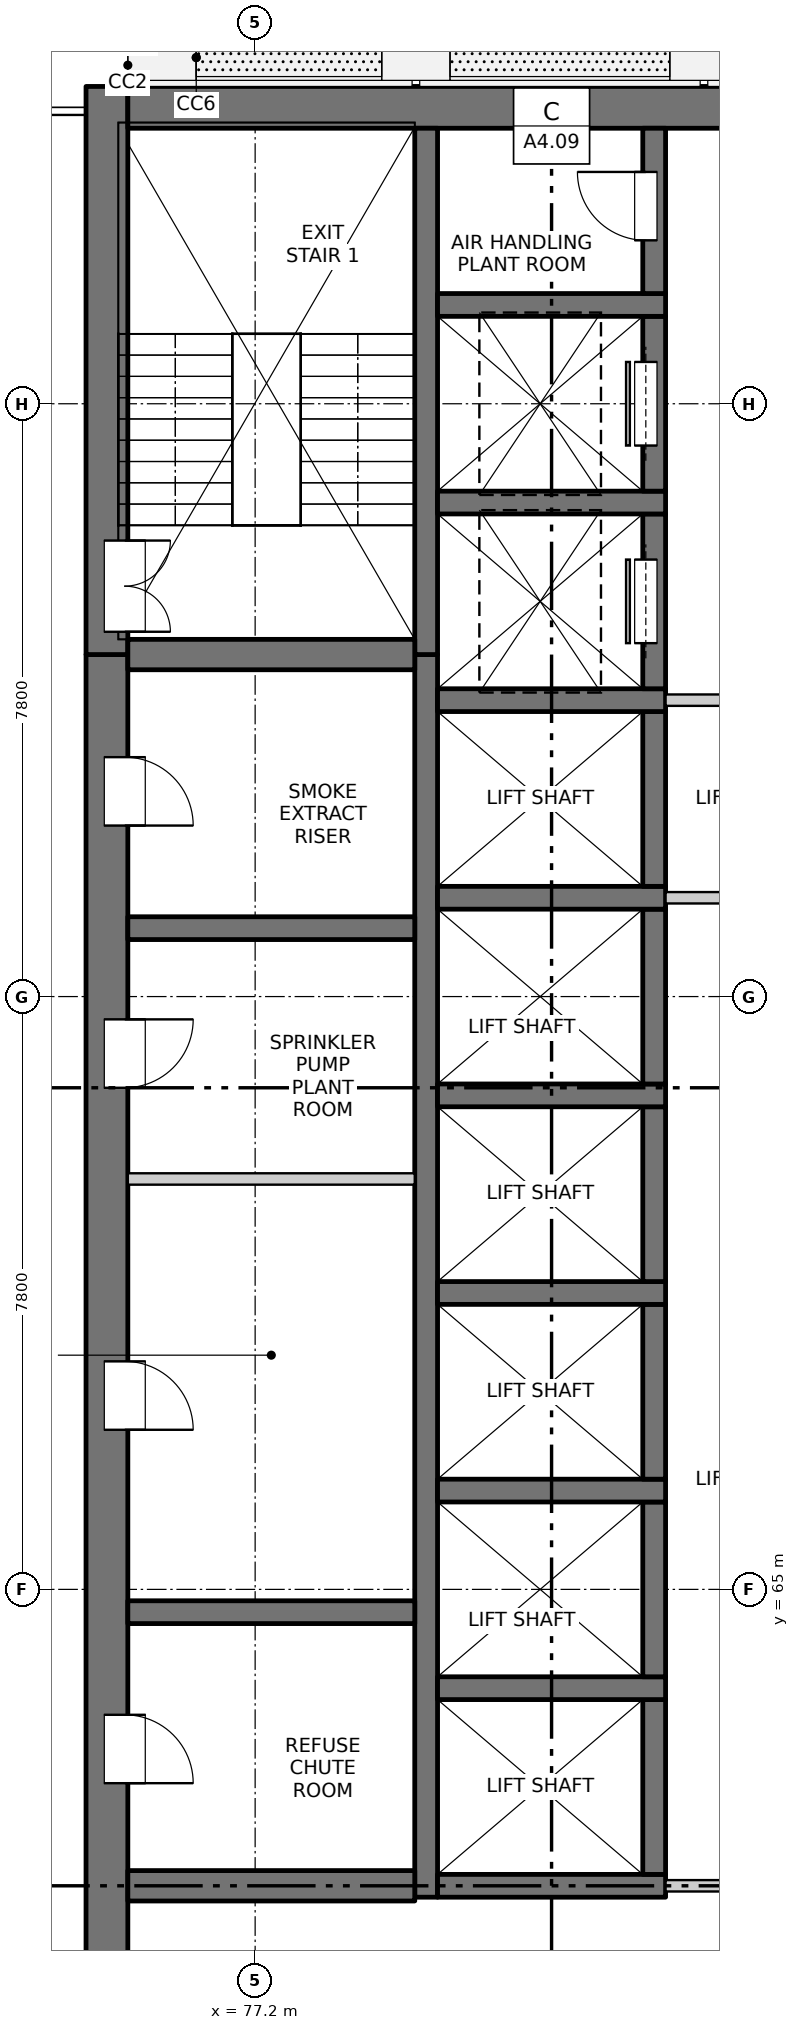
"""IFC4 building model, lengths in metres.
Left out: names, types, materials, properties, quantities, classifications, styles, units other than length and angle.
Written with IfcOpenShell. Run it as: python <this file> out.ifc"""

import sys

from ifc_helpers import new_model, si_unit, direction, frame, frame_2d, origin, place, context, subcontext, project, spatial, rectangle, extrude, element, fill, save


model = new_model("IFC4")
c1 = context("Model", 3, precision=1e-05, world=origin(), true_north=direction((0.0, 1.0)))
c2 = subcontext(c1, "Body", "Model", "MODEL_VIEW")
j1 = project(units=[si_unit("LENGTHUNIT", "METRE"), si_unit("PLANEANGLEUNIT", "RADIAN")], contexts=[c1])
p1 = place(None, origin())
s1 = spatial("IfcSite", under=j1, at=p1, CompositionType="ELEMENT")
p2 = place(p1, origin())
s2 = spatial("IfcBuilding", under=s1, at=p2, CompositionType="ELEMENT")
p3 = place(p2, frame((0.0, 0.0, 116.9)))
s3 = spatial("IfcBuildingStorey", under=s2, at=p3, CompositionType="ELEMENT", Elevation=116.9)
p4 = place(p3, frame((75.25, 54.975, -0.3), z_axis=(0.0, 0.0, 1.0), x_axis=(0.0, 1.0, 0.0)))
e1 = element("IfcWall", 1, at=p4, inside=s3, PredefinedType="SOLIDWALL", context=c2, shape_type="SweptSolid", body=[
    extrude(rectangle(XDim=22.325, YDim=0.55, at=frame_2d((11.163, 0.0))), origin(), (0.0, 0.0, 1.0), 6.8),
])
p5 = place(p4, frame((7.475, 0.0, 0.3)))
e2 = element("IfcOpeningElement", 2, at=p5, cuts=e1, PredefinedType="OPENING", context=c2, shape_type="SweptSolid", body=[
    extrude(rectangle(XDim=0.9, YDim=2.1, at=frame_2d((0.45, 1.05))), frame((0.0, 0.285, 0.0), z_axis=(0.0, -1.0, 0.0), x_axis=(1.0, 0.0, 0.0)), (0.0, 0.0, 1.0), 0.57),
])
p6 = place(p4, frame((12.125, 0.0, 0.3)))
e3 = element("IfcOpeningElement", 3, at=p6, cuts=e1, PredefinedType="OPENING", context=c2, shape_type="SweptSolid", body=[
    extrude(rectangle(XDim=0.9, YDim=2.1, at=frame_2d((0.45, 1.05))), frame((0.0, 0.285, 0.0), z_axis=(0.0, -1.0, 0.0), x_axis=(1.0, 0.0, 0.0)), (0.0, 0.0, 1.0), 0.57),
])
p7 = place(p4, frame((16.625, 0.0, 0.3)))
e4 = element("IfcOpeningElement", 4, at=p7, cuts=e1, PredefinedType="OPENING", context=c2, shape_type="SweptSolid", body=[
    extrude(rectangle(XDim=0.9, YDim=2.1, at=frame_2d((0.45, 1.05))), frame((0.0, 0.285, 0.0), z_axis=(0.0, -1.0, 0.0), x_axis=(1.0, 0.0, 0.0)), (0.0, 0.0, 1.0), 0.57),
])
p8 = place(p4, frame((20.075, 0.0, 0.3)))
e5 = element("IfcOpeningElement", 5, at=p8, cuts=e1, PredefinedType="OPENING", context=c2, shape_type="SweptSolid", body=[
    extrude(rectangle(XDim=0.9, YDim=2.1, at=frame_2d((0.45, 1.05))), frame((0.0, 0.285, 0.0), z_axis=(0.0, -1.0, 0.0), x_axis=(1.0, 0.0, 0.0)), (0.0, 0.0, 1.0), 0.57),
])
p9 = place(p3, frame((75.25, 77.3, -0.3), z_axis=(0.0, 0.0, 1.0), x_axis=(0.0, 1.0, 0.0)))
e6 = element("IfcWall", 6, at=p9, inside=s3, PredefinedType="SOLIDWALL", context=c2, shape_type="SweptSolid", body=[
    extrude(rectangle(XDim=7.475, YDim=0.55, at=frame_2d((3.737, 0.0))), origin(), (0.0, 0.0, 1.0), 6.8),
])
p10 = place(p9, frame((0.3, 0.0, 0.3)))
e7 = element("IfcOpeningElement", 7, at=p10, cuts=e6, PredefinedType="OPENING", context=c2, shape_type="SweptSolid", body=[
    extrude(rectangle(XDim=1.2, YDim=2.1, at=frame_2d((0.6, 1.05))), frame((0.0, 0.285, 0.0), z_axis=(0.0, -1.0, 0.0), x_axis=(1.0, 0.0, 0.0)), (0.0, 0.0, 1.0), 0.57),
])
p11 = place(p3, frame((75.525, 84.5, -0.3), z_axis=(0.0, 0.0, 1.0), x_axis=(1.0, 0.0, 0.0)))
e8 = element("IfcWall", 8, at=p11, inside=s3, PredefinedType="SOLIDWALL", context=c2, shape_type="SweptSolid", body=[
    extrude(rectangle(XDim=18.95, YDim=0.55, at=frame_2d((9.475, 0.0))), origin(), (0.0, 0.0, 1.0), 6.8),
])
p12 = place(p3, frame((79.45, 60.95, -0.3), z_axis=(0.0, 0.0, 1.0), x_axis=(0.0, 1.0, 0.0)))
e9 = element("IfcWall", 9, at=p12, inside=s3, PredefinedType="SOLIDWALL", context=c2, shape_type="SweptSolid", body=[
    extrude(rectangle(XDim=16.35, YDim=0.3, at=frame_2d((8.175, 0.0))), origin(), (0.0, 0.0, 1.0), 6.8),
])
p13 = place(p3, frame((79.45, 77.3, -0.3), z_axis=(0.0, 0.0, 1.0), x_axis=(0.0, 1.0, 0.0)))
e10 = element("IfcWall", 10, at=p13, inside=s3, PredefinedType="SOLIDWALL", context=c2, shape_type="SweptSolid", body=[
    extrude(rectangle(XDim=6.925, YDim=0.3, at=frame_2d((3.462, 0.0))), origin(), (0.0, 0.0, 1.0), 6.8),
])
p14 = place(p3, frame((79.6, 61.1, -0.3), z_axis=(0.0, 0.0, 1.0), x_axis=(1.0, 0.0, 0.0)))
e11 = element("IfcWall", 11, at=p14, inside=s3, PredefinedType="SOLIDWALL", context=c2, shape_type="SweptSolid", body=[
    extrude(rectangle(XDim=3.0, YDim=0.3, at=frame_2d((1.5, 0.0))), origin(), (0.0, 0.0, 1.0), 6.8),
])
p15 = place(p3, frame((82.45, 61.25, -0.3), z_axis=(0.0, 0.0, 1.0), x_axis=(0.0, 1.0, 0.0)))
e12 = element("IfcWall", 12, at=p15, inside=s3, PredefinedType="SOLIDWALL", context=c2, shape_type="SweptSolid", body=[
    extrude(rectangle(XDim=2.3, YDim=0.3, at=frame_2d((1.15, 0.0))), origin(), (0.0, 0.0, 1.0), 6.8),
])
p16 = place(p3, frame((79.6, 63.7, -0.3), z_axis=(0.0, 0.0, 1.0), x_axis=(1.0, 0.0, 0.0)))
e13 = element("IfcWall", 13, at=p16, inside=s3, PredefinedType="SOLIDWALL", context=c2, shape_type="SweptSolid", body=[
    extrude(rectangle(XDim=3.0, YDim=0.3, at=frame_2d((1.5, 0.0))), origin(), (0.0, 0.0, 1.0), 6.8),
])
p17 = place(p3, frame((82.45, 63.85, -0.3), z_axis=(0.0, 0.0, 1.0), x_axis=(0.0, 1.0, 0.0)))
e14 = element("IfcWall", 14, at=p17, inside=s3, PredefinedType="SOLIDWALL", context=c2, shape_type="SweptSolid", body=[
    extrude(rectangle(XDim=2.3, YDim=0.3, at=frame_2d((1.15, 0.0))), origin(), (0.0, 0.0, 1.0), 6.8),
])
p18 = place(p3, frame((79.6, 66.3, -0.3), z_axis=(0.0, 0.0, 1.0), x_axis=(1.0, 0.0, 0.0)))
e15 = element("IfcWall", 15, at=p18, inside=s3, PredefinedType="SOLIDWALL", context=c2, shape_type="SweptSolid", body=[
    extrude(rectangle(XDim=3.0, YDim=0.3, at=frame_2d((1.5, 0.0))), origin(), (0.0, 0.0, 1.0), 6.8),
])
p19 = place(p3, frame((82.45, 66.45, -0.3), z_axis=(0.0, 0.0, 1.0), x_axis=(0.0, 1.0, 0.0)))
e16 = element("IfcWall", 16, at=p19, inside=s3, PredefinedType="SOLIDWALL", context=c2, shape_type="SweptSolid", body=[
    extrude(rectangle(XDim=2.3, YDim=0.3, at=frame_2d((1.15, 0.0))), origin(), (0.0, 0.0, 1.0), 6.8),
])
p20 = place(p3, frame((79.6, 68.9, -0.3), z_axis=(0.0, 0.0, 1.0), x_axis=(1.0, 0.0, 0.0)))
e17 = element("IfcWall", 17, at=p20, inside=s3, PredefinedType="SOLIDWALL", context=c2, shape_type="SweptSolid", body=[
    extrude(rectangle(XDim=3.0, YDim=0.3, at=frame_2d((1.5, 0.0))), origin(), (0.0, 0.0, 1.0), 6.8),
])
p21 = place(p3, frame((82.45, 69.05, -0.3), z_axis=(0.0, 0.0, 1.0), x_axis=(0.0, 1.0, 0.0)))
e18 = element("IfcWall", 18, at=p21, inside=s3, PredefinedType="SOLIDWALL", context=c2, shape_type="SweptSolid", body=[
    extrude(rectangle(XDim=2.3, YDim=0.3, at=frame_2d((1.15, 0.0))), origin(), (0.0, 0.0, 1.0), 6.8),
])
p22 = place(p3, frame((79.6, 71.5, -0.3), z_axis=(0.0, 0.0, 1.0), x_axis=(1.0, 0.0, 0.0)))
e19 = element("IfcWall", 19, at=p22, inside=s3, PredefinedType="SOLIDWALL", context=c2, shape_type="SweptSolid", body=[
    extrude(rectangle(XDim=3.0, YDim=0.3, at=frame_2d((1.5, 0.0))), origin(), (0.0, 0.0, 1.0), 6.8),
])
p23 = place(p3, frame((82.45, 71.65, -0.3), z_axis=(0.0, 0.0, 1.0), x_axis=(0.0, 1.0, 0.0)))
e20 = element("IfcWall", 20, at=p23, inside=s3, PredefinedType="SOLIDWALL", context=c2, shape_type="SweptSolid", body=[
    extrude(rectangle(XDim=2.3, YDim=0.3, at=frame_2d((1.15, 0.0))), origin(), (0.0, 0.0, 1.0), 6.8),
])
p24 = place(p3, frame((79.6, 74.1, -0.3), z_axis=(0.0, 0.0, 1.0), x_axis=(1.0, 0.0, 0.0)))
e21 = element("IfcWall", 21, at=p24, inside=s3, PredefinedType="SOLIDWALL", context=c2, shape_type="SweptSolid", body=[
    extrude(rectangle(XDim=3.0, YDim=0.3, at=frame_2d((1.5, 0.0))), origin(), (0.0, 0.0, 1.0), 6.8),
])
p25 = place(p3, frame((82.45, 74.25, -0.3), z_axis=(0.0, 0.0, 1.0), x_axis=(0.0, 1.0, 0.0)))
e22 = element("IfcWall", 22, at=p25, inside=s3, PredefinedType="SOLIDWALL", context=c2, shape_type="SweptSolid", body=[
    extrude(rectangle(XDim=2.3, YDim=0.3, at=frame_2d((1.15, 0.0))), origin(), (0.0, 0.0, 1.0), 6.8),
])
p26 = place(p3, frame((79.6, 76.7, -0.3), z_axis=(0.0, 0.0, 1.0), x_axis=(1.0, 0.0, 0.0)))
e23 = element("IfcWall", 23, at=p26, inside=s3, PredefinedType="SOLIDWALL", context=c2, shape_type="SweptSolid", body=[
    extrude(rectangle(XDim=3.0, YDim=0.3, at=frame_2d((1.5, 0.0))), origin(), (0.0, 0.0, 1.0), 6.8),
])
p27 = place(p3, frame((82.45, 76.85, -0.3), z_axis=(0.0, 0.0, 1.0), x_axis=(0.0, 1.0, 0.0)))
e24 = element("IfcWall", 24, at=p27, inside=s3, PredefinedType="SOLIDWALL", context=c2, shape_type="SweptSolid", body=[
    extrude(rectangle(XDim=2.3, YDim=0.3, at=frame_2d((1.15, 0.0))), origin(), (0.0, 0.0, 1.0), 6.8),
])
p28 = place(p27, frame((0.6, 0.0, 0.3)))
e25 = element("IfcOpeningElement", 25, at=p28, cuts=e24, PredefinedType="OPENING", context=c2, shape_type="SweptSolid", body=[
    extrude(rectangle(XDim=1.1, YDim=2.1, at=frame_2d((0.55, 1.05))), frame((0.0, 0.16, 0.0), z_axis=(0.0, -1.0, 0.0), x_axis=(1.0, 0.0, 0.0)), (0.0, 0.0, 1.0), 0.32),
])
p29 = place(p3, frame((79.6, 79.3, -0.3), z_axis=(0.0, 0.0, 1.0), x_axis=(1.0, 0.0, 0.0)))
e26 = element("IfcWall", 26, at=p29, inside=s3, PredefinedType="SOLIDWALL", context=c2, shape_type="SweptSolid", body=[
    extrude(rectangle(XDim=3.0, YDim=0.3, at=frame_2d((1.5, 0.0))), origin(), (0.0, 0.0, 1.0), 6.8),
])
p30 = place(p3, frame((82.45, 79.45, -0.3), z_axis=(0.0, 0.0, 1.0), x_axis=(0.0, 1.0, 0.0)))
e27 = element("IfcWall", 27, at=p30, inside=s3, PredefinedType="SOLIDWALL", context=c2, shape_type="SweptSolid", body=[
    extrude(rectangle(XDim=2.3, YDim=0.3, at=frame_2d((1.15, 0.0))), origin(), (0.0, 0.0, 1.0), 6.8),
])
p31 = place(p30, frame((0.6, 0.0, 0.3)))
e28 = element("IfcOpeningElement", 28, at=p31, cuts=e27, PredefinedType="OPENING", context=c2, shape_type="SweptSolid", body=[
    extrude(rectangle(XDim=1.1, YDim=2.1, at=frame_2d((0.55, 1.05))), frame((0.0, 0.16, 0.0), z_axis=(0.0, -1.0, 0.0), x_axis=(1.0, 0.0, 0.0)), (0.0, 0.0, 1.0), 0.32),
])
p32 = place(p3, frame((79.6, 81.9, -0.3), z_axis=(0.0, 0.0, 1.0), x_axis=(1.0, 0.0, 0.0)))
e29 = element("IfcWall", 29, at=p32, inside=s3, PredefinedType="SOLIDWALL", context=c2, shape_type="SweptSolid", body=[
    extrude(rectangle(XDim=3.0, YDim=0.3, at=frame_2d((1.5, 0.0))), origin(), (0.0, 0.0, 1.0), 6.8),
])
p33 = place(p3, frame((82.45, 82.05, -0.3), z_axis=(0.0, 0.0, 1.0), x_axis=(0.0, 1.0, 0.0)))
e30 = element("IfcWall", 30, at=p33, inside=s3, PredefinedType="SOLIDWALL", context=c2, shape_type="SweptSolid", body=[
    extrude(rectangle(XDim=2.175, YDim=0.3, at=frame_2d((1.087, 0.0))), origin(), (0.0, 0.0, 1.0), 6.8),
])
p34 = place(p33, frame((0.7, 0.0, 0.3)))
e31 = element("IfcOpeningElement", 31, at=p34, cuts=e30, PredefinedType="OPENING", context=c2, shape_type="SweptSolid", body=[
    extrude(rectangle(XDim=0.9, YDim=2.1, at=frame_2d((0.45, 1.05))), frame((0.0, 0.16, 0.0), z_axis=(0.0, -1.0, 0.0), x_axis=(1.0, 0.0, 0.0)), (0.0, 0.0, 1.0), 0.32),
])
p35 = place(p3, frame((75.525, 61.1, -0.3), z_axis=(0.0, 0.0, 1.0), x_axis=(1.0, 0.0, 0.0)))
e32 = element("IfcWall", 32, at=p35, inside=s3, PredefinedType="SOLIDWALL", context=c2, shape_type="SweptSolid", body=[
    extrude(rectangle(XDim=3.775, YDim=0.4, at=frame_2d((1.888, 0.0))), origin(), (0.0, 0.0, 1.0), 6.8),
])
for number, where, z_axis, x_axis in (
    (33, (75.525, 64.7, -0.3), (0.0, 0.0, 1.0), (1.0, 0.0, 0.0)),
    (34, (75.525, 73.7, -0.3), (0.0, 0.0, 1.0), (1.0, 0.0, 0.0)),
):
    element("IfcWall", number, at=place(p3, frame(where, z_axis=z_axis, x_axis=x_axis)), inside=s3, PredefinedType="SOLIDWALL", context=c2, shape_type="SweptSolid", body=[
        extrude(rectangle(XDim=3.775, YDim=0.3, at=frame_2d((1.888, 0.0))), origin(), (0.0, 0.0, 1.0), 6.8),
    ])
p36 = place(p3, frame((75.525, 77.3, -0.3), z_axis=(0.0, 0.0, 1.0), x_axis=(1.0, 0.0, 0.0)))
e35 = element("IfcWall", 35, at=p36, inside=s3, PredefinedType="SOLIDWALL", context=c2, shape_type="SweptSolid", body=[
    extrude(rectangle(XDim=3.775, YDim=0.4, at=frame_2d((1.888, 0.0))), origin(), (0.0, 0.0, 1.0), 6.8),
])
p37 = place(p3, frame((82.6, 61.1, 0.0), z_axis=(0.0, 0.0, 1.0), x_axis=(1.0, 0.0, 0.0)))
e36 = element("IfcWall", 36, at=p37, inside=s3, PredefinedType="PARTITIONING", context=c2, shape_type="SweptSolid", body=[
    extrude(rectangle(XDim=4.8, YDim=0.15, at=frame_2d((2.4, 0.0))), origin(), (0.0, 0.0, 1.0), 6.5),
])
p38 = place(p37, frame((1.5, 0.0, 0.0)))
e37 = element("IfcOpeningElement", 37, at=p38, cuts=e36, PredefinedType="OPENING", context=c2, shape_type="SweptSolid", body=[
    extrude(rectangle(XDim=1.8, YDim=2.1, at=frame_2d((0.9, 1.05))), frame((0.0, 0.085, 0.0), z_axis=(0.0, -1.0, 0.0), x_axis=(1.0, 0.0, 0.0)), (0.0, 0.0, 1.0), 0.17),
])
p39 = place(p3, frame((75.525, 70.4, 0.0), z_axis=(0.0, 0.0, 1.0), x_axis=(1.0, 0.0, 0.0)))
e38 = element("IfcWall", 38, at=p39, inside=s3, PredefinedType="PARTITIONING", context=c2, shape_type="SweptSolid", body=[
    extrude(rectangle(XDim=3.775, YDim=0.15, at=frame_2d((1.887, 0.0))), origin(), (0.0, 0.0, 1.0), 6.5),
])
p40 = place(p3, frame((82.6, 74.1, 0.0), z_axis=(0.0, 0.0, 1.0), x_axis=(1.0, 0.0, 0.0)))
e39 = element("IfcWall", 39, at=p40, inside=s3, PredefinedType="PARTITIONING", context=c2, shape_type="SweptSolid", body=[
    extrude(rectangle(XDim=4.8, YDim=0.15, at=frame_2d((2.4, 0.0))), origin(), (0.0, 0.0, 1.0), 6.5),
])
p41 = place(p40, frame((1.5, 0.0, 0.0)))
e40 = element("IfcOpeningElement", 40, at=p41, cuts=e39, PredefinedType="OPENING", context=c2, shape_type="SweptSolid", body=[
    extrude(rectangle(XDim=1.8, YDim=2.1, at=frame_2d((0.9, 1.05))), frame((0.0, 0.085, 0.0), z_axis=(0.0, -1.0, 0.0), x_axis=(1.0, 0.0, 0.0)), (0.0, 0.0, 1.0), 0.17),
])
p42 = place(p3, frame((82.6, 76.7, 0.0), z_axis=(0.0, 0.0, 1.0), x_axis=(1.0, 0.0, 0.0)))
e41 = element("IfcWall", 41, at=p42, inside=s3, PredefinedType="PARTITIONING", context=c2, shape_type="SweptSolid", body=[
    extrude(rectangle(XDim=4.8, YDim=0.15, at=frame_2d((2.4, 0.0))), origin(), (0.0, 0.0, 1.0), 6.5),
])
p43 = place(p42, frame((1.5, 0.0, 0.0)))
e42 = element("IfcOpeningElement", 42, at=p43, cuts=e41, PredefinedType="OPENING", context=c2, shape_type="SweptSolid", body=[
    extrude(rectangle(XDim=1.8, YDim=2.1, at=frame_2d((0.9, 1.05))), frame((0.0, 0.085, 0.0), z_axis=(0.0, -1.0, 0.0), x_axis=(1.0, 0.0, 0.0)), (0.0, 0.0, 1.0), 0.17),
])
p44 = place(p5, origin())
e43 = element("IfcDoor", 43, at=p44, inside=s3, OperationType="SINGLE_SWING_RIGHT", PredefinedType="DOOR", context=c2, shape_type="SweptSolid", body=[
    extrude(rectangle(XDim=0.9, YDim=2.1, at=frame_2d((0.45, 1.05))), frame((0.0, -0.21, 0.0), z_axis=(0.0, -1.0, 0.0), x_axis=(1.0, 0.0, 0.0)), (0.0, 0.0, 1.0), 0.05),
])
fill(e2, e43)
p45 = place(p6, origin())
e44 = element("IfcDoor", 44, at=p45, inside=s3, OperationType="SINGLE_SWING_RIGHT", PredefinedType="DOOR", context=c2, shape_type="SweptSolid", body=[
    extrude(rectangle(XDim=0.9, YDim=2.1, at=frame_2d((0.45, 1.05))), frame((0.0, -0.21, 0.0), z_axis=(0.0, -1.0, 0.0), x_axis=(1.0, 0.0, 0.0)), (0.0, 0.0, 1.0), 0.05),
])
fill(e3, e44)
p46 = place(p7, origin())
e45 = element("IfcDoor", 45, at=p46, inside=s3, OperationType="SINGLE_SWING_LEFT", PredefinedType="DOOR", context=c2, shape_type="SweptSolid", body=[
    extrude(rectangle(XDim=0.9, YDim=2.1, at=frame_2d((0.45, 1.05))), frame((0.0, -0.21, 0.0), z_axis=(0.0, -1.0, 0.0), x_axis=(1.0, 0.0, 0.0)), (0.0, 0.0, 1.0), 0.05),
])
fill(e4, e45)
p47 = place(p8, origin())
e46 = element("IfcDoor", 46, at=p47, inside=s3, OperationType="SINGLE_SWING_RIGHT", PredefinedType="DOOR", context=c2, shape_type="SweptSolid", body=[
    extrude(rectangle(XDim=0.9, YDim=2.1, at=frame_2d((0.45, 1.05))), frame((0.0, -0.21, 0.0), z_axis=(0.0, -1.0, 0.0), x_axis=(1.0, 0.0, 0.0)), (0.0, 0.0, 1.0), 0.05),
])
fill(e5, e46)
p48 = place(p28, origin())
e47 = element("IfcDoor", 47, at=p48, inside=s3, OperationType="SLIDING_TO_LEFT", PredefinedType="DOOR", context=c2, shape_type="SweptSolid", body=[
    extrude(rectangle(XDim=1.1, YDim=2.1, at=frame_2d((0.55, 1.05))), frame((0.0, 0.135, 0.0), z_axis=(0.0, -1.0, 0.0), x_axis=(1.0, 0.0, 0.0)), (0.0, 0.0, 1.0), 0.05),
])
fill(e25, e47)
p49 = place(p10, origin())
e48 = element("IfcDoor", 48, at=p49, inside=s3, OperationType="DOUBLE_DOOR_SINGLE_SWING", PredefinedType="DOOR", context=c2, shape_type="SweptSolid", body=[
    extrude(rectangle(XDim=1.2, YDim=2.1, at=frame_2d((0.6, 1.05))), frame((0.0, -0.21, 0.0), z_axis=(0.0, -1.0, 0.0), x_axis=(1.0, 0.0, 0.0)), (0.0, 0.0, 1.0), 0.05),
])
fill(e7, e48)
p50 = place(p31, origin())
e49 = element("IfcDoor", 49, at=p50, inside=s3, OperationType="SLIDING_TO_LEFT", PredefinedType="DOOR", context=c2, shape_type="SweptSolid", body=[
    extrude(rectangle(XDim=1.1, YDim=2.1, at=frame_2d((0.55, 1.05))), frame((0.0, 0.135, 0.0), z_axis=(0.0, -1.0, 0.0), x_axis=(1.0, 0.0, 0.0)), (0.0, 0.0, 1.0), 0.05),
])
fill(e28, e49)
p51 = place(p34, origin())
e50 = element("IfcDoor", 50, at=p51, inside=s3, OperationType="SINGLE_SWING_RIGHT", PredefinedType="DOOR", context=c2, shape_type="SweptSolid", body=[
    extrude(rectangle(XDim=0.9, YDim=2.1, at=frame_2d((0.45, 1.05))), frame((0.0, 0.135, 0.0), z_axis=(0.0, -1.0, 0.0), x_axis=(1.0, 0.0, 0.0)), (0.0, 0.0, 1.0), 0.05),
])
fill(e31, e50)
save(model, sys.argv[1])
